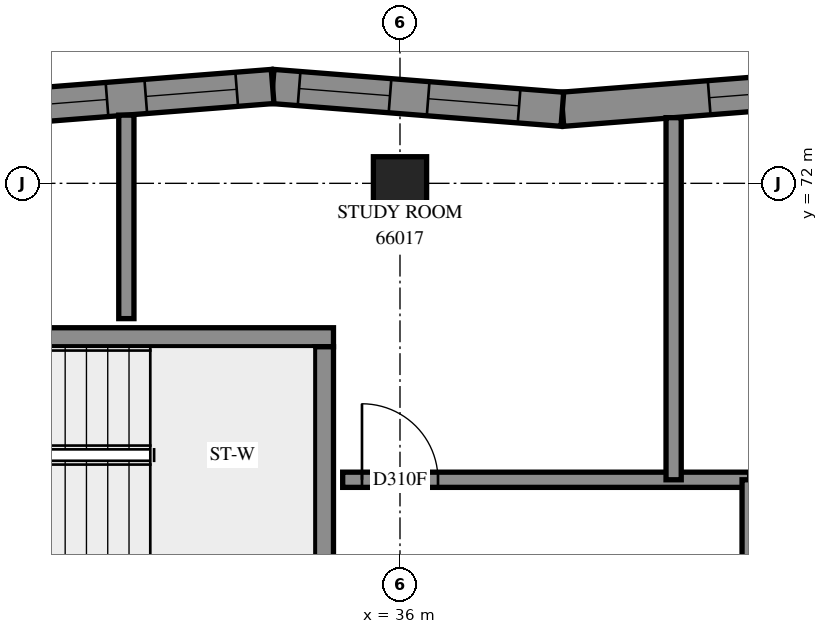
"""IFC4 building model, lengths in metres.
Left out: names, types, materials, properties, quantities, classifications, styles, units other than length and angle.
Written with IfcOpenShell. Run it as: python <this file> out.ifc"""

import sys

from ifc_helpers import new_model, si_unit, direction, frame, frame_2d, origin, origin_2d, place, context, subcontext, project, spatial, polyline, rectangle, outline, extrude, element, fill, save


model = new_model("IFC4")
c1 = context("Model", 3, precision=1e-05, world=origin(), true_north=direction((0.0, 1.0)))
c2 = subcontext(c1, "Body", "Model", "MODEL_VIEW")
j1 = project(units=[si_unit("LENGTHUNIT", "METRE"), si_unit("PLANEANGLEUNIT", "RADIAN")], contexts=[c1])
p1 = place(None, origin())
s1 = spatial("IfcSite", under=j1, at=p1, CompositionType="ELEMENT")
p2 = place(p1, origin())
s2 = spatial("IfcBuilding", under=s1, at=p2, CompositionType="ELEMENT")
p3 = place(p2, frame((0.0, 0.0, 243.8)))
s3 = spatial("IfcBuildingStorey", under=s2, at=p3, CompositionType="ELEMENT", Elevation=243.8)
p4 = place(p3, frame((36.0, 72.0, 0.0), z_axis=(0.0, 0.0, 1.0), x_axis=(1.0, 0.0, 0.0)))
e1 = element("IfcColumn", 1, at=p4, inside=s3, PredefinedType="COLUMN", context=c2, shape_type="SweptSolid", body=[
    extrude(rectangle(XDim=0.7, YDim=0.7, at=origin_2d()), origin(), (0.0, 0.0, 1.0), 3.1),
])
p5 = place(p3, frame((41.949, 73.274, 0.0), z_axis=(0.0, 0.0, 1.0), x_axis=(-0.9969177178, -0.0784542156, 0.0)))
e2 = element("IfcWall", 2, at=p5, inside=s3, PredefinedType="SOLIDWALL", context=c2, shape_type="SweptSolid", body=[
    extrude(outline(polyline([(-0.018, -0.225), (3.806, -0.225), (3.842, 0.225), (0.018, 0.225), (-0.018, -0.225)])), origin(), (0.0, 0.0, 1.0), 3.1),
])
p6 = place(p5, frame((0.687, 0.0, 0.45)))
e3 = element("IfcOpeningElement", 3, at=p6, cuts=e2, PredefinedType="OPENING", context=c2, shape_type="SweptSolid", body=[
    extrude(rectangle(XDim=1.2, YDim=2.55, at=frame_2d((0.6, 1.275))), frame((0.0, 0.235, 0.0), z_axis=(0.0, -1.0, 0.0), x_axis=(1.0, 0.0, 0.0)), (0.0, 0.0, 1.0), 0.47),
])
p7 = place(p3, frame((38.136, 72.974, 0.0), z_axis=(0.0, 0.0, 1.0), x_axis=(-0.9969177178, 0.0784542156, 0.0)))
e4 = element("IfcWall", 4, at=p7, inside=s3, PredefinedType="SOLIDWALL", context=c2, shape_type="SweptSolid", body=[
    extrude(outline(polyline([(0.018, -0.225), (3.842, -0.225), (3.806, 0.225), (-0.018, 0.225), (0.018, -0.225)])), origin(), (0.0, 0.0, 1.0), 3.1),
])
p8 = place(p7, frame((0.572, 0.0, 0.45)))
e5 = element("IfcOpeningElement", 5, at=p8, cuts=e4, PredefinedType="OPENING", context=c2, shape_type="SweptSolid", body=[
    extrude(rectangle(XDim=1.2, YDim=2.55, at=frame_2d((0.6, 1.275))), frame((0.0, 0.235, 0.0), z_axis=(0.0, -1.0, 0.0), x_axis=(1.0, 0.0, 0.0)), (0.0, 0.0, 1.0), 0.47),
])
p9 = place(p7, frame((2.275, 0.0, 0.45)))
e6 = element("IfcOpeningElement", 6, at=p9, cuts=e4, PredefinedType="OPENING", context=c2, shape_type="SweptSolid", body=[
    extrude(rectangle(XDim=1.2, YDim=2.55, at=frame_2d((0.6, 1.275))), frame((0.0, 0.235, 0.0), z_axis=(0.0, -1.0, 0.0), x_axis=(1.0, 0.0, 0.0)), (0.0, 0.0, 1.0), 0.47),
])
p10 = place(p3, frame((34.324, 73.274, 0.0), z_axis=(0.0, 0.0, 1.0), x_axis=(-0.9969172534, -0.078460116, 0.0)))
e7 = element("IfcWall", 7, at=p10, inside=s3, PredefinedType="SOLIDWALL", context=c2, shape_type="SweptSolid", body=[
    extrude(outline(polyline([(-0.018, -0.225), (3.806, -0.225), (3.877, 0.225), (0.018, 0.225), (-0.018, -0.225)])), origin(), (0.0, 0.0, 1.0), 3.1),
])
p11 = place(p10, frame((0.474, 0.0, 0.45)))
e8 = element("IfcOpeningElement", 8, at=p11, cuts=e7, PredefinedType="OPENING", context=c2, shape_type="SweptSolid", body=[
    extrude(rectangle(XDim=1.2, YDim=2.55, at=frame_2d((0.6, 1.275))), frame((0.0, 0.235, 0.0), z_axis=(0.0, -1.0, 0.0), x_axis=(1.0, 0.0, 0.0)), (0.0, 0.0, 1.0), 0.47),
])
p12 = place(p10, frame((2.186, 0.0, 0.45)))
e9 = element("IfcOpeningElement", 9, at=p12, cuts=e7, PredefinedType="OPENING", context=c2, shape_type="SweptSolid", body=[
    extrude(rectangle(XDim=1.2, YDim=2.55, at=frame_2d((0.6, 1.275))), frame((0.0, 0.235, 0.0), z_axis=(0.0, -1.0, 0.0), x_axis=(1.0, 0.0, 0.0)), (0.0, 0.0, 1.0), 0.47),
])
p13 = place(p3, frame((28.875, 69.975, -0.3), z_axis=(0.0, 0.0, 1.0), x_axis=(1.0, 0.0, 0.0)))
e10 = element("IfcWall", 10, at=p13, inside=s3, PredefinedType="SOLIDWALL", context=c2, shape_type="SweptSolid", body=[
    extrude(rectangle(XDim=6.25, YDim=0.25, at=frame_2d((3.125, 0.0))), origin(), (0.0, 0.0, 1.0), 3.4),
])
p14 = place(p3, frame((35.0, 67.0, -0.3), z_axis=(0.0, 0.0, 1.0), x_axis=(0.0, 1.0, 0.0)))
e11 = element("IfcWall", 11, at=p14, inside=s3, PredefinedType="SOLIDWALL", context=c2, shape_type="SweptSolid", body=[
    extrude(rectangle(XDim=2.85, YDim=0.25, at=frame_2d((1.425, 0.0))), origin(), (0.0, 0.0, 1.0), 3.4),
])
p15 = place(p3, frame((35.246, 68.1, 0.0), z_axis=(0.0, 0.0, 1.0), x_axis=(1.0, 0.0, 0.0)))
e12 = element("IfcWall", 12, at=p15, inside=s3, PredefinedType="PARTITIONING", context=c2, shape_type="SweptSolid", body=[
    extrude(rectangle(XDim=5.354, YDim=0.2, at=frame_2d((2.677, 0.0))), origin(), (0.0, 0.0, 1.0), 3.1),
])
p16 = place(p15, frame((0.254, 0.0, 0.0)))
e13 = element("IfcOpeningElement", 13, at=p16, cuts=e12, PredefinedType="OPENING", context=c2, shape_type="SweptSolid", body=[
    extrude(rectangle(XDim=1.0, YDim=2.1, at=frame_2d((0.5, 1.05))), frame((0.0, 0.11, 0.0), z_axis=(0.0, -1.0, 0.0), x_axis=(1.0, 0.0, 0.0)), (0.0, 0.0, 1.0), 0.22),
])
p17 = place(p3, frame((39.6, 68.1, 0.0), z_axis=(0.0, 0.0, 1.0), x_axis=(0.0, 1.0, 0.0)))
e14 = element("IfcWall", 14, at=p17, inside=s3, PredefinedType="PARTITIONING", context=c2, shape_type="SweptSolid", body=[
    extrude(rectangle(XDim=4.764, YDim=0.2, at=frame_2d((2.382, 0.0))), origin(), (0.0, 0.0, 1.0), 3.1),
])
p18 = place(p3, frame((40.6, 63.41, 0.0), z_axis=(0.0, 0.0, 1.0), x_axis=(0.0, 1.0, 0.0)))
e15 = element("IfcWall", 15, at=p18, inside=s3, PredefinedType="PARTITIONING", context=c2, shape_type="SweptSolid", body=[
    extrude(rectangle(XDim=4.69, YDim=0.2, at=frame_2d((2.345, 0.0))), origin(), (0.0, 0.0, 1.0), 3.1),
])
p19 = place(p18, frame((0.138, 0.0, 0.0)))
e16 = element("IfcOpeningElement", 16, at=p19, cuts=e15, PredefinedType="OPENING", context=c2, shape_type="SweptSolid", body=[
    extrude(rectangle(XDim=1.0, YDim=2.1, at=frame_2d((0.5, 1.05))), frame((0.0, 0.11, 0.0), z_axis=(0.0, -1.0, 0.0), x_axis=(1.0, 0.0, 0.0)), (0.0, 0.0, 1.0), 0.22),
])
p20 = place(p3, frame((32.4, 70.22, 0.0), z_axis=(0.0, 0.0, 1.0), x_axis=(0.0, 1.0, 0.0)))
e17 = element("IfcWall", 17, at=p20, inside=s3, PredefinedType="PARTITIONING", context=c2, shape_type="SweptSolid", body=[
    extrude(rectangle(XDim=2.677, YDim=0.2, at=frame_2d((1.339, 0.0))), origin(), (0.0, 0.0, 1.0), 3.1),
])
p21 = place(p6, origin())
e18 = element("IfcWindow", 18, at=p21, inside=s3, PartitioningType="SINGLE_PANEL", PredefinedType="WINDOW", context=c2, shape_type="SweptSolid", body=[
    extrude(rectangle(XDim=1.2, YDim=2.55, at=frame_2d((0.6, 1.275))), frame((0.0, 0.205, 0.0), z_axis=(0.0, -1.0, 0.0), x_axis=(1.0, 0.0, 0.0)), (0.0, 0.0, 1.0), 0.06),
])
fill(e3, e18)
p22 = place(p8, origin())
e19 = element("IfcWindow", 19, at=p22, inside=s3, PartitioningType="SINGLE_PANEL", PredefinedType="WINDOW", context=c2, shape_type="SweptSolid", body=[
    extrude(rectangle(XDim=1.2, YDim=2.55, at=frame_2d((0.6, 1.275))), frame((0.0, 0.205, 0.0), z_axis=(0.0, -1.0, 0.0), x_axis=(1.0, 0.0, 0.0)), (0.0, 0.0, 1.0), 0.06),
])
fill(e5, e19)
p23 = place(p9, origin())
e20 = element("IfcWindow", 20, at=p23, inside=s3, PartitioningType="SINGLE_PANEL", PredefinedType="WINDOW", context=c2, shape_type="SweptSolid", body=[
    extrude(rectangle(XDim=1.2, YDim=2.55, at=frame_2d((0.6, 1.275))), frame((0.0, 0.205, 0.0), z_axis=(0.0, -1.0, 0.0), x_axis=(1.0, 0.0, 0.0)), (0.0, 0.0, 1.0), 0.06),
])
fill(e6, e20)
p24 = place(p11, origin())
e21 = element("IfcWindow", 21, at=p24, inside=s3, PartitioningType="SINGLE_PANEL", PredefinedType="WINDOW", context=c2, shape_type="SweptSolid", body=[
    extrude(rectangle(XDim=1.2, YDim=2.55, at=frame_2d((0.6, 1.275))), frame((0.0, 0.205, 0.0), z_axis=(0.0, -1.0, 0.0), x_axis=(1.0, 0.0, 0.0)), (0.0, 0.0, 1.0), 0.06),
])
fill(e8, e21)
p25 = place(p12, origin())
e22 = element("IfcWindow", 22, at=p25, inside=s3, PartitioningType="SINGLE_PANEL", PredefinedType="WINDOW", context=c2, shape_type="SweptSolid", body=[
    extrude(rectangle(XDim=1.2, YDim=2.55, at=frame_2d((0.6, 1.275))), frame((0.0, 0.205, 0.0), z_axis=(0.0, -1.0, 0.0), x_axis=(1.0, 0.0, 0.0)), (0.0, 0.0, 1.0), 0.06),
])
fill(e9, e22)
p26 = place(p16, origin())
e23 = element("IfcDoor", 23, at=p26, inside=s3, OperationType="SINGLE_SWING_LEFT", PredefinedType="DOOR", context=c2, shape_type="SweptSolid", body=[
    extrude(rectangle(XDim=1.0, YDim=2.1, at=frame_2d((0.5, 1.05))), frame((0.0, 0.025, 0.0), z_axis=(0.0, -1.0, 0.0), x_axis=(1.0, 0.0, 0.0)), (0.0, 0.0, 1.0), 0.05),
])
fill(e13, e23)
save(model, sys.argv[1])
